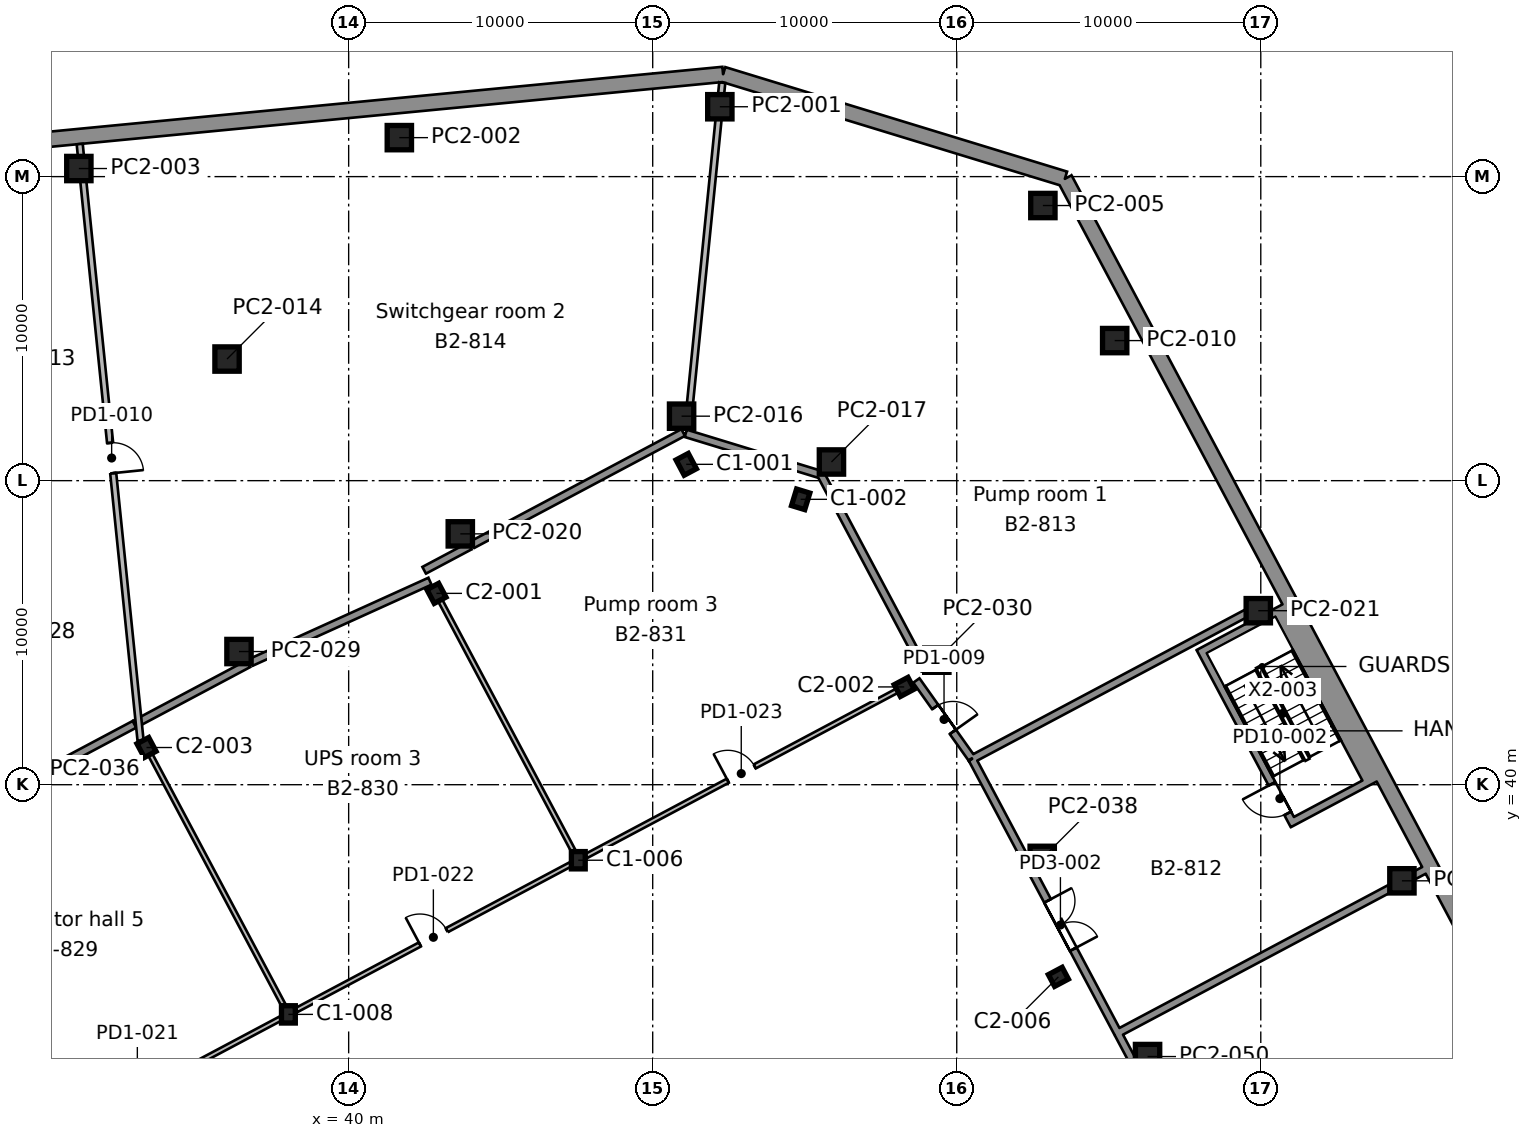
"""IFC4 building model, lengths in metres.
Left out: names, types, materials, properties, quantities, classifications, styles, units other than length and angle.
Written with IfcOpenShell. Run it as: python <this file> out.ifc"""

import sys

from ifc_helpers import new_model, si_unit, direction, frame, frame_2d, origin, origin_2d, place, context, subcontext, project, spatial, rectangle, i_section, extrude, element, fill, save


model = new_model("IFC4")
c1 = context("Model", 3, precision=1e-05, world=origin(), true_north=direction((0.0, 1.0)))
c2 = subcontext(c1, "Body", "Model", "MODEL_VIEW")
j1 = project(units=[si_unit("LENGTHUNIT", "METRE"), si_unit("PLANEANGLEUNIT", "RADIAN")], contexts=[c1])
p1 = place(None, origin())
s1 = spatial("IfcSite", under=j1, at=p1, CompositionType="ELEMENT")
p2 = place(p1, origin())
s2 = spatial("IfcBuilding", under=s1, at=p2, CompositionType="ELEMENT")
p3 = place(p2, frame((0.0, 0.0, -9.0)))
s3 = spatial("IfcBuildingStorey", under=s2, at=p3, CompositionType="ELEMENT", Elevation=-9.0)
p4 = place(p3, frame((38.018, 32.446, 0.0), z_axis=(0.0, 0.0, 1.0), x_axis=(1.0, 0.0, 0.0)))
e1 = element("IfcColumn", 1, at=p4, inside=s3, PredefinedType="COLUMN", context=c2, shape_type="SweptSolid", body=[
    extrude(i_section(OverallWidth=0.455, OverallDepth=0.569, WebThickness=0.078, FlangeThickness=0.125, FilletRadius=0.015, at=origin_2d()), origin(), (0.0, 0.0, 1.0), 4.5),
])
p5 = place(p3, frame((63.343, 33.68, 0.0), z_axis=(0.0, 0.0, 1.0), x_axis=(-0.469471562786, 0.882947592859, 0.0)))
e2 = element("IfcColumn", 2, at=p5, inside=s3, PredefinedType="COLUMN", context=c2, shape_type="SweptSolid", body=[
    extrude(i_section(OverallWidth=0.437, OverallDepth=0.513, WebThickness=0.061, FlangeThickness=0.097, FilletRadius=0.015, at=origin_2d()), origin(), (0.0, 0.0, 1.0), 4.5),
])
p6 = place(p3, frame((47.553, 37.516, 0.0), z_axis=(0.0, 0.0, 1.0), x_axis=(1.0, 0.0, 0.0)))
e3 = element("IfcColumn", 3, at=p6, inside=s3, PredefinedType="COLUMN", context=c2, shape_type="SweptSolid", body=[
    extrude(i_section(OverallWidth=0.455, OverallDepth=0.569, WebThickness=0.078, FlangeThickness=0.125, FilletRadius=0.015, at=origin_2d()), origin(), (0.0, 0.0, 1.0), 4.5),
])
for number, where, z_axis, x_axis in (
    (4, (33.351, 41.223, 0.0), (0.0, 0.0, 1.0), (-0.883, -0.469, 0.0)),
    (5, (58.272, 43.216, 0.0), (0.0, 0.0, 1.0), (-0.469, 0.883, 0.0)),
    (6, (42.887, 46.293, 0.0), (0.0, 0.0, 1.0), (-0.883, -0.469, 0.0)),
):
    element("IfcColumn", number, at=place(p3, frame(where, z_axis=z_axis, x_axis=x_axis)), inside=s3, PredefinedType="COLUMN", context=c2, shape_type="SweptSolid", body=[
        extrude(i_section(OverallWidth=0.437, OverallDepth=0.513, WebThickness=0.061, FlangeThickness=0.097, FilletRadius=0.015, at=origin_2d()), origin(), (0.0, 0.0, 1.0), 4.5),
    ])
for number, where, z_axis, x_axis in (
    (7, (54.867, 49.386, 0.0), (0.0, 0.0, 1.0), (-0.956, 0.292, 0.0)),
    (8, (51.103, 50.537, 0.0), (0.0, 0.0, 1.0), (-0.883, -0.469, 0.0)),
):
    element("IfcColumn", number, at=place(p3, frame(where, z_axis=z_axis, x_axis=x_axis)), inside=s3, PredefinedType="COLUMN", context=c2, shape_type="SweptSolid", body=[
        extrude(i_section(OverallWidth=0.455, OverallDepth=0.569, WebThickness=0.078, FlangeThickness=0.125, FilletRadius=0.015, at=origin_2d()), origin(), (0.0, 0.0, 1.0), 4.5),
    ])
p7 = place(p3, frame((85.221, 19.18, 0.0), z_axis=(0.0, 0.0, 1.0), x_axis=(-0.469470569953, 0.882948120757, 0.0)))
e9 = element("IfcWall", 9, at=p7, inside=s3, PredefinedType="SOLIDWALL", context=c2, shape_type="SweptSolid", body=[
    extrude(rectangle(XDim=46.148, YDim=0.5, at=frame_2d((23.074, 0.0))), origin(), (0.0, 0.0, 1.0), 4.5),
])
p8 = place(p3, frame((63.556, 59.926, 0.0), z_axis=(0.0, 0.0, 1.0), x_axis=(-0.956305605615, 0.292368925623, 0.0)))
e10 = element("IfcWall", 10, at=p8, inside=s3, PredefinedType="SOLIDWALL", context=c2, shape_type="SweptSolid", body=[
    extrude(rectangle(XDim=11.754, YDim=0.5, at=frame_2d((5.877, 0.0))), origin(), (0.0, 0.0, 1.0), 4.5),
])
p9 = place(p3, frame((52.315, 63.363, 0.0), z_axis=(0.0, 0.0, 1.0), x_axis=(-0.995387233017, -0.095938815644, 0.0)))
e11 = element("IfcWall", 11, at=p9, inside=s3, PredefinedType="SOLIDWALL", context=c2, shape_type="SweptSolid", body=[
    extrude(rectangle(XDim=95.624, YDim=0.5, at=frame_2d((47.812, 0.0))), origin(), (0.0, 0.0, 1.0), 4.5),
])
for number, where, z_axis, x_axis in (
    (12, (66.276, 31.059, 0.0), (0.0, 0.0, 1.0), (1.0, 0.0, 0.0)),
    (13, (74.642, 36.839, 0.0), (0.0, 0.0, 1.0), (1.0, 0.0, 0.0)),
    (14, (62.811, 37.577, 0.0), (0.0, 0.0, 1.0), (1.0, 0.0, 0.0)),
    (15, (59.345, 44.096, 0.0), (0.0, 0.0, 1.0), (1.0, 0.0, 0.0)),
    (16, (36.393, 44.38, 0.0), (0.0, 0.0, 1.0), (1.0, 0.0, 0.0)),
    (17, (69.918, 45.723, 0.0), (0.0, 0.0, 1.0), (1.0, 0.0, 0.0)),
    (18, (43.672, 48.25, 0.0), (0.0, 0.0, 1.0), (1.0, 0.0, 0.0)),
    (19, (55.879, 50.614, 0.0), (0.0, 0.0, 1.0), (1.0, 0.0, 0.0)),
    (20, (50.95, 52.121, 0.0), (0.0, 0.0, 1.0), (1.0, 0.0, 0.0)),
    (21, (36.0, 54.0, 0.0), (0.0, 0.0, 1.0), (1.0, 0.0, 0.0)),
    (22, (65.195, 54.607, 0.0), (0.0, 0.0, 1.0), (1.0, 0.0, 0.0)),
    (23, (62.833, 59.049, 0.0), (0.0, 0.0, 1.0), (1.0, 0.0, 0.0)),
    (24, (31.126, 60.266, 0.0), (0.0, 0.0, 1.0), (1.0, 0.0, 0.0)),
    (25, (41.667, 61.282, 0.0), (0.0, 0.0, 1.0), (1.0, 0.0, 0.0)),
    (26, (52.208, 62.298, 0.0), (0.0, 0.0, 1.0), (1.0, 0.0, 0.0)),
):
    element("IfcColumn", number, at=place(p3, frame(where, z_axis=z_axis, x_axis=x_axis)), inside=s3, PredefinedType="COLUMN", context=c2, shape_type="SweptSolid", body=[
        extrude(rectangle(XDim=0.8, YDim=0.8, at=origin_2d()), origin(), (0.0, 0.0, 1.0), 4.1),
    ])
p10 = place(p3, frame((75.366, 37.182, 0.0), z_axis=(0.0, 0.0, 1.0), x_axis=(-0.882960484464, -0.4694473164, 0.0)))
e27 = element("IfcWall", 27, at=p10, inside=s3, PredefinedType="SOLIDWALL", context=c2, shape_type="SweptSolid", body=[
    extrude(rectangle(XDim=0.367, YDim=0.25, at=frame_2d((0.183, 0.0))), origin(), (0.0, 0.0, 1.0), 4.1),
])
p11 = place(p3, frame((74.242, 36.585, 0.0), z_axis=(0.0, 0.0, 1.0), x_axis=(-0.882936179938, -0.469493026738, 0.0)))
e28 = element("IfcWall", 28, at=p11, inside=s3, PredefinedType="SOLIDWALL", context=c2, shape_type="SweptSolid", body=[
    extrude(rectangle(XDim=10.127, YDim=0.25, at=frame_2d((5.063, 0.0))), origin(), (0.0, 0.0, 1.0), 4.1),
])
p12 = place(p3, frame((65.303, 31.825, 0.0), z_axis=(0.0, 0.0, 1.0), x_axis=(0.46947695358, -0.882944726502, 0.0)))
e29 = element("IfcWall", 29, at=p12, inside=s3, PredefinedType="SOLIDWALL", context=c2, shape_type="SweptSolid", body=[
    extrude(rectangle(XDim=1.22, YDim=0.25, at=frame_2d((0.61, 0.0))), origin(), (0.0, 0.0, 1.0), 4.1),
])
p13 = place(p3, frame((69.518, 45.635, 0.0), z_axis=(0.0, 0.0, 1.0), x_axis=(-0.882956154604, -0.46945546013, 0.0)))
e30 = element("IfcWall", 30, at=p13, inside=s3, PredefinedType="SOLIDWALL", context=c2, shape_type="SweptSolid", body=[
    extrude(rectangle(XDim=10.206, YDim=0.25, at=frame_2d((5.103, 0.0))), origin(), (0.0, 0.0, 1.0), 4.1),
])
p14 = place(p3, frame((60.505, 40.848, 0.0), z_axis=(0.0, 0.0, 1.0), x_axis=(0.469448377302, -0.882959920409, 0.0)))
e31 = element("IfcWall", 31, at=p14, inside=s3, PredefinedType="SOLIDWALL", context=c2, shape_type="SweptSolid", body=[
    extrude(rectangle(XDim=4.059, YDim=0.25, at=frame_2d((2.03, 0.0))), origin(), (0.0, 0.0, 1.0), 4.1),
])
p15 = place(p3, frame((62.457, 37.177, 0.0), z_axis=(0.0, 0.0, 1.0), x_axis=(0.469458615732, -0.882954476808, 0.0)))
e32 = element("IfcWall", 32, at=p15, inside=s3, PredefinedType="SOLIDWALL", context=c2, shape_type="SweptSolid", body=[
    extrude(rectangle(XDim=6.06, YDim=0.25, at=frame_2d((3.03, 0.0))), origin(), (0.0, 0.0, 1.0), 4.1),
])
p16 = place(p15, frame((1.13, 0.0, 0.0)))
e33 = element("IfcOpeningElement", 33, at=p16, cuts=e32, PredefinedType="OPENING", context=c2, shape_type="SweptSolid", body=[
    extrude(rectangle(XDim=1.8, YDim=2.1, at=frame_2d((0.9, 1.05))), frame((0.0, 0.135, 0.0), z_axis=(0.0, -1.0, 0.0), x_axis=(1.0, 0.0, 0.0)), (0.0, 0.0, 1.0), 0.27),
])
p17 = place(p3, frame((52.288, 63.089, 0.0), z_axis=(0.0, 0.0, 1.0), x_axis=(-0.099933903019, -0.994994077886, 0.0)))
e34 = element("IfcWall", 34, at=p17, inside=s3, PredefinedType="PARTITIONING", context=c2, shape_type="SweptSolid", body=[
    extrude(rectangle(XDim=0.393, YDim=0.2, at=frame_2d((0.197, 0.0))), origin(), (0.0, 0.0, 1.0), 4.1),
])
p18 = place(p3, frame((52.168, 61.898, 0.0), z_axis=(0.0, 0.0, 1.0), x_axis=(-0.100124403506, -0.994974926228, 0.0)))
e35 = element("IfcWall", 35, at=p18, inside=s3, PredefinedType="PARTITIONING", context=c2, shape_type="SweptSolid", body=[
    extrude(rectangle(XDim=9.424, YDim=0.2, at=frame_2d((4.712, 0.0))), origin(), (0.0, 0.0, 1.0), 4.1),
])
p19 = place(p3, frame((58.672, 43.428, 0.0), z_axis=(0.0, 0.0, 1.0), x_axis=(0.578928632739, -0.815378217881, 0.0)))
e36 = element("IfcWall", 36, at=p19, inside=s3, PredefinedType="SOLIDWALL", context=c2, shape_type="SweptSolid", body=[
    extrude(rectangle(XDim=3.143, YDim=0.25, at=frame_2d((1.572, 0.0))), origin(), (0.0, 0.0, 1.0), 4.1),
])
p20 = place(p19, frame((1.072, 0.0, 0.0)))
e37 = element("IfcOpeningElement", 37, at=p20, cuts=e36, PredefinedType="OPENING", context=c2, shape_type="SweptSolid", body=[
    extrude(rectangle(XDim=1.0, YDim=2.1, at=frame_2d((0.5, 1.05))), frame((0.0, 0.135, 0.0), z_axis=(0.0, -1.0, 0.0), x_axis=(1.0, 0.0, 0.0)), (0.0, 0.0, 1.0), 0.27),
])
p21 = place(p3, frame((51.087, 51.556, 0.0), z_axis=(0.0, 0.0, 1.0), x_axis=(0.956310816829, -0.292351879788, 0.0)))
e38 = element("IfcWall", 38, at=p21, inside=s3, PredefinedType="SOLIDWALL", context=c2, shape_type="SweptSolid", body=[
    extrude(rectangle(XDim=4.651, YDim=0.25, at=frame_2d((2.326, 0.0))), origin(), (0.0, 0.0, 1.0), 4.1),
])
p22 = place(p3, frame((55.535, 50.196, 0.0), z_axis=(0.0, 0.0, 1.0), x_axis=(0.469471385401, -0.882947687176, 0.0)))
e39 = element("IfcWall", 39, at=p22, inside=s3, PredefinedType="SOLIDWALL", context=c2, shape_type="SweptSolid", body=[
    extrude(rectangle(XDim=7.264, YDim=0.25, at=frame_2d((3.632, 0.0))), origin(), (0.0, 0.0, 1.0), 4.1),
])
p23 = place(p3, frame((31.155, 61.072, 0.0), z_axis=(0.0, 0.0, 1.0), x_axis=(0.095769432991, -0.995403544149, 0.0)))
e40 = element("IfcWall", 40, at=p23, inside=s3, PredefinedType="PARTITIONING", context=c2, shape_type="SweptSolid", body=[
    extrude(rectangle(XDim=0.408, YDim=0.2, at=frame_2d((0.204, 0.0))), origin(), (0.0, 0.0, 1.0), 4.1),
])
p24 = place(p3, frame((31.271, 59.866, 0.0), z_axis=(0.0, 0.0, 1.0), x_axis=(0.10182537806, -0.994802288087, 0.0)))
e41 = element("IfcWall", 41, at=p24, inside=s3, PredefinedType="PARTITIONING", context=c2, shape_type="SweptSolid", body=[
    extrude(rectangle(XDim=18.51, YDim=0.2, at=frame_2d((9.255, 0.0))), origin(), (0.0, 0.0, 1.0), 4.1),
])
p25 = place(p24, frame((8.669, 0.0, 0.0)))
e42 = element("IfcOpeningElement", 42, at=p25, cuts=e41, PredefinedType="OPENING", context=c2, shape_type="SweptSolid", body=[
    extrude(rectangle(XDim=1.0, YDim=2.1, at=frame_2d((0.5, 1.05))), frame((0.0, 0.11, 0.0), z_axis=(0.0, -1.0, 0.0), x_axis=(1.0, 0.0, 0.0)), (0.0, 0.0, 1.0), 0.22),
])
p26 = place(p3, frame((32.989, 42.004, 0.0), z_axis=(0.0, 0.0, 1.0), x_axis=(0.882952706143, 0.469461945971, 0.0)))
e43 = element("IfcWall", 43, at=p26, inside=s3, PredefinedType="SOLIDWALL", context=c2, shape_type="SweptSolid", body=[
    extrude(rectangle(XDim=4.209, YDim=0.25, at=frame_2d((2.104, 0.0))), origin(), (0.0, 0.0, 1.0), 4.1),
])
p27 = place(p3, frame((36.793, 44.027, 0.0), z_axis=(0.0, 0.0, 1.0), x_axis=(0.910758391685, 0.412939646892, 0.0)))
e44 = element("IfcWall", 44, at=p27, inside=s3, PredefinedType="SOLIDWALL", context=c2, shape_type="SweptSolid", body=[
    extrude(rectangle(XDim=6.457, YDim=0.25, at=frame_2d((3.229, 0.0))), origin(), (0.0, 0.0, 1.0), 4.1),
])
p28 = place(p3, frame((42.483, 47.052, 0.0), z_axis=(0.0, 0.0, 1.0), x_axis=(0.882940813988, 0.469484311766, 0.0)))
e45 = element("IfcWall", 45, at=p28, inside=s3, PredefinedType="SOLIDWALL", context=c2, shape_type="SweptSolid", body=[
    extrude(rectangle(XDim=1.699, YDim=0.25, at=frame_2d((0.85, 0.0))), origin(), (0.0, 0.0, 1.0), 4.1),
])
p29 = place(p3, frame((44.072, 47.897, 0.0), z_axis=(0.0, 0.0, 1.0), x_axis=(0.882948932855, 0.469469042612, 0.0)))
e46 = element("IfcWall", 46, at=p29, inside=s3, PredefinedType="SOLIDWALL", context=c2, shape_type="SweptSolid", body=[
    extrude(rectangle(XDim=7.849, YDim=0.25, at=frame_2d((3.924, 0.0))), origin(), (0.0, 0.0, 1.0), 4.1),
])
p30 = place(p3, frame((29.514, 40.156, 0.0), z_axis=(0.0, 0.0, 1.0), x_axis=(0.882952549127, 0.469462241283, 0.0)))
e47 = element("IfcWall", 47, at=p30, inside=s3, PredefinedType="SOLIDWALL", context=c2, shape_type="SweptSolid", body=[
    extrude(rectangle(XDim=3.895, YDim=0.25, at=frame_2d((1.948, 0.0))), origin(), (0.0, 0.0, 1.0), 4.1),
])
p31 = place(p3, frame((37.755, 32.307, 0.0), z_axis=(0.0, 0.0, 1.0), x_axis=(-0.882947426762, -0.469471875169, 0.0)))
e48 = element("IfcWall", 48, at=p31, inside=s3, PredefinedType="PARTITIONING", context=c2, shape_type="SweptSolid", body=[
    extrude(rectangle(XDim=10.503, YDim=0.15, at=frame_2d((5.251, 0.0))), origin(), (0.0, 0.0, 1.0), 4.1),
])
p32 = place(p31, frame((4.83, 0.0, 0.0)))
e49 = element("IfcOpeningElement", 49, at=p32, cuts=e48, PredefinedType="OPENING", context=c2, shape_type="SweptSolid", body=[
    extrude(rectangle(XDim=1.0, YDim=2.1, at=frame_2d((0.5, 1.05))), frame((0.0, 0.085, 0.0), z_axis=(0.0, -1.0, 0.0), x_axis=(1.0, 0.0, 0.0)), (0.0, 0.0, 1.0), 0.17),
])
p33 = place(p3, frame((47.291, 37.376, 0.0), z_axis=(0.0, 0.0, 1.0), x_axis=(-0.88295489766, -0.469457824194, 0.0)))
e50 = element("IfcWall", 50, at=p33, inside=s3, PredefinedType="PARTITIONING", context=c2, shape_type="SweptSolid", body=[
    extrude(rectangle(XDim=10.204, YDim=0.15, at=frame_2d((5.102, 0.0))), origin(), (0.0, 0.0, 1.0), 4.1),
])
p34 = place(p33, frame((4.602, 0.0, 0.0)))
e51 = element("IfcOpeningElement", 51, at=p34, cuts=e50, PredefinedType="OPENING", context=c2, shape_type="SweptSolid", body=[
    extrude(rectangle(XDim=1.0, YDim=2.1, at=frame_2d((0.5, 1.05))), frame((0.0, 0.085, 0.0), z_axis=(0.0, -1.0, 0.0), x_axis=(1.0, 0.0, 0.0)), (0.0, 0.0, 1.0), 0.17),
])
p35 = place(p3, frame((58.046, 43.095, 0.0), z_axis=(0.0, 0.0, 1.0), x_axis=(-0.882944872937, -0.469476678179, 0.0)))
e52 = element("IfcWall", 52, at=p35, inside=s3, PredefinedType="PARTITIONING", context=c2, shape_type="SweptSolid", body=[
    extrude(rectangle(XDim=11.586, YDim=0.15, at=frame_2d((5.793, 0.0))), origin(), (0.0, 0.0, 1.0), 4.1),
])
p36 = place(p35, frame((5.314, 0.0, 0.0)))
e53 = element("IfcOpeningElement", 53, at=p36, cuts=e52, PredefinedType="OPENING", context=c2, shape_type="SweptSolid", body=[
    extrude(rectangle(XDim=1.0, YDim=2.1, at=frame_2d((0.5, 1.05))), frame((0.0, 0.085, 0.0), z_axis=(0.0, -1.0, 0.0), x_axis=(1.0, 0.0, 0.0)), (0.0, 0.0, 1.0), 0.17),
])
p37 = place(p3, frame((37.85, 32.762, 0.0), z_axis=(0.0, 0.0, 1.0), x_axis=(-0.469481854544, 0.882942120557, 0.0)))
e54 = element("IfcWall", 54, at=p37, inside=s3, PredefinedType="PARTITIONING", context=c2, shape_type="SweptSolid", body=[
    extrude(rectangle(XDim=9.326, YDim=0.15, at=frame_2d((4.663, 0.0))), origin(), (0.0, 0.0, 1.0), 4.1),
])
p38 = place(p3, frame((47.385, 37.832, 0.0), z_axis=(0.0, 0.0, 1.0), x_axis=(-0.469472297485, 0.882947202212, 0.0)))
e55 = element("IfcWall", 55, at=p38, inside=s3, PredefinedType="PARTITIONING", context=c2, shape_type="SweptSolid", body=[
    extrude(rectangle(XDim=9.326, YDim=0.15, at=frame_2d((4.663, 0.0))), origin(), (0.0, 0.0, 1.0), 4.1),
])
p39 = place(p3, frame((73.4, 40.027, 0.0), z_axis=(0.0, 0.0, 1.0), x_axis=(-0.882970050864, -0.469429322983, 0.0)))
e56 = element("IfcWall", 56, at=p39, inside=s3, PredefinedType="SOLIDWALL", context=c2, shape_type="SweptSolid", body=[
    extrude(rectangle(XDim=2.8, YDim=0.25, at=frame_2d((1.4, 0.0))), origin(), (0.0, 0.0, 1.0), 4.1),
])
p40 = place(p3, frame((70.419, 45.633, 0.0), z_axis=(0.0, 0.0, 1.0), x_axis=(-0.882950835185, -0.469465464807, 0.0)))
e57 = element("IfcWall", 57, at=p40, inside=s3, PredefinedType="SOLIDWALL", context=c2, shape_type="SweptSolid", body=[
    extrude(rectangle(XDim=2.8, YDim=0.25, at=frame_2d((1.4, 0.0))), origin(), (0.0, 0.0, 1.0), 4.1),
])
p41 = place(p3, frame((71.097, 38.66, 0.0), z_axis=(0.0, 0.0, 1.0), x_axis=(-0.469489660743, 0.882937969766, 0.0)))
e58 = element("IfcWall", 58, at=p41, inside=s3, PredefinedType="SOLIDWALL", context=c2, shape_type="SweptSolid", body=[
    extrude(rectangle(XDim=6.6, YDim=0.25, at=frame_2d((3.3, 0.0))), origin(), (0.0, 0.0, 1.0), 4.1),
])
p42 = place(p41, frame((0.45, 0.0, 0.0)))
e59 = element("IfcOpeningElement", 59, at=p42, cuts=e58, PredefinedType="OPENING", context=c2, shape_type="SweptSolid", body=[
    extrude(rectangle(XDim=1.1, YDim=2.1, at=frame_2d((0.55, 1.05))), frame((0.0, 0.135, 0.0), z_axis=(0.0, -1.0, 0.0), x_axis=(1.0, 0.0, 0.0)), (0.0, 0.0, 1.0), 0.27),
])
p43 = place(p3, frame((73.635, 40.01, 0.0), z_axis=(0.0, 0.0, 1.0), x_axis=(-0.469445489529, 0.882961455761, 0.0)))
e60 = element("IfcWall", 60, at=p43, inside=s3, PredefinedType="SOLIDWALL", context=c2, shape_type="SweptSolid", body=[
    extrude(rectangle(XDim=6.6, YDim=0.4, at=frame_2d((3.3, 0.0))), origin(), (0.0, 0.0, 1.0), 4.1),
])
p44 = place(p42, origin())
e61 = element("IfcDoor", 61, at=p44, inside=s3, OperationType="SINGLE_SWING_RIGHT", PredefinedType="DOOR", context=c2, shape_type="SweptSolid", body=[
    extrude(rectangle(XDim=1.1, YDim=2.1, at=frame_2d((0.55, 1.05))), frame((0.0, 0.025, 0.0), z_axis=(0.0, -1.0, 0.0), x_axis=(1.0, 0.0, 0.0)), (0.0, 0.0, 1.0), 0.05),
])
fill(e59, e61)
p45 = place(p36, frame((1.0, 0.0, 0.0), z_axis=(0.0, 0.0, 1.0), x_axis=(-1.0, 0.0, 0.0)))
e62 = element("IfcDoor", 62, at=p45, inside=s3, OperationType="SINGLE_SWING_LEFT", PredefinedType="DOOR", context=c2, shape_type="SweptSolid", body=[
    extrude(rectangle(XDim=1.0, YDim=2.1, at=frame_2d((0.5, 1.05))), frame((0.0, 0.025, 0.0), z_axis=(0.0, -1.0, 0.0), x_axis=(1.0, 0.0, 0.0)), (0.0, 0.0, 1.0), 0.05),
])
fill(e53, e62)
p46 = place(p34, frame((1.0, 0.0, 0.0), z_axis=(0.0, 0.0, 1.0), x_axis=(-1.0, 0.0, 0.0)))
e63 = element("IfcDoor", 63, at=p46, inside=s3, OperationType="SINGLE_SWING_LEFT", PredefinedType="DOOR", context=c2, shape_type="SweptSolid", body=[
    extrude(rectangle(XDim=1.0, YDim=2.1, at=frame_2d((0.5, 1.05))), frame((0.0, 0.025, 0.0), z_axis=(0.0, -1.0, 0.0), x_axis=(1.0, 0.0, 0.0)), (0.0, 0.0, 1.0), 0.05),
])
fill(e51, e63)
p47 = place(p16, origin())
e64 = element("IfcDoor", 64, at=p47, inside=s3, OperationType="DOUBLE_DOOR_SINGLE_SWING", PredefinedType="DOOR", context=c2, shape_type="SweptSolid", body=[
    extrude(rectangle(XDim=1.8, YDim=2.1, at=frame_2d((0.9, 1.05))), frame((0.0, 0.025, 0.0), z_axis=(0.0, -1.0, 0.0), x_axis=(1.0, 0.0, 0.0)), (0.0, 0.0, 1.0), 0.05),
])
fill(e33, e64)
p48 = place(p20, origin())
e65 = element("IfcDoor", 65, at=p48, inside=s3, OperationType="SINGLE_SWING_RIGHT", PredefinedType="DOOR", context=c2, shape_type="SweptSolid", body=[
    extrude(rectangle(XDim=1.0, YDim=2.1, at=frame_2d((0.5, 1.05))), frame((0.0, 0.025, 0.0), z_axis=(0.0, -1.0, 0.0), x_axis=(1.0, 0.0, 0.0)), (0.0, 0.0, 1.0), 0.05),
])
fill(e37, e65)
p49 = place(p25, origin())
e66 = element("IfcDoor", 66, at=p49, inside=s3, OperationType="SINGLE_SWING_RIGHT", PredefinedType="DOOR", context=c2, shape_type="SweptSolid", body=[
    extrude(rectangle(XDim=1.0, YDim=2.1, at=frame_2d((0.5, 1.05))), frame((0.0, 0.025, 0.0), z_axis=(0.0, -1.0, 0.0), x_axis=(1.0, 0.0, 0.0)), (0.0, 0.0, 1.0), 0.05),
])
fill(e42, e66)
save(model, sys.argv[1])
